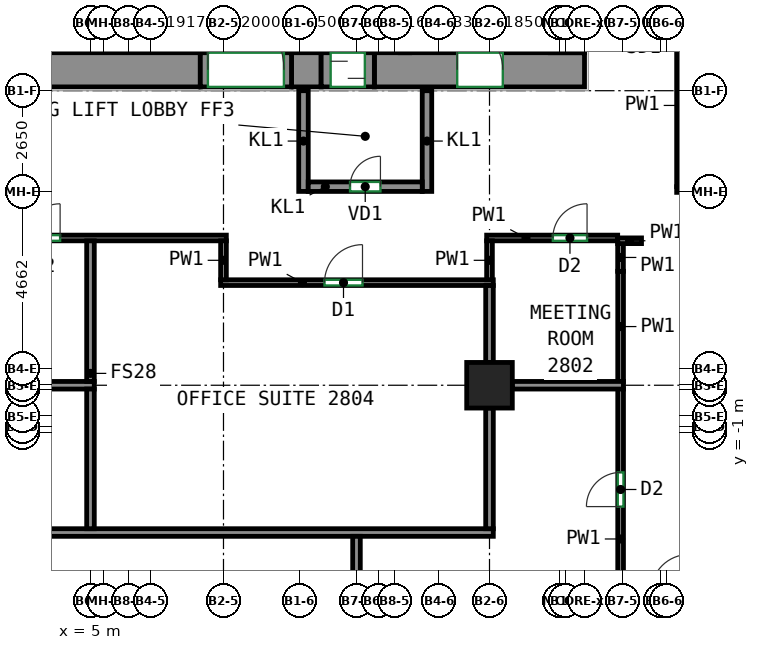
"""IFC4 building model, lengths in metres.
Left out: names, types, materials, properties, quantities, classifications, styles, units other than length and angle.
Written with IfcOpenShell. Run it as: python <this file> out.ifc"""

import sys

from ifc_helpers import new_model, si_unit, direction, frame, frame_2d, origin, origin_2d, place, context, subcontext, project, spatial, rectangle, extrude, source, transform, mapped, element, fill, save


model = new_model("IFC4")
c1 = context("Model", 3, precision=1e-05, world=origin(), true_north=direction((0.0, 1.0)))
c2 = subcontext(c1, "Body", "Model", "MODEL_VIEW")
j1 = project(units=[si_unit("LENGTHUNIT", "METRE"), si_unit("PLANEANGLEUNIT", "RADIAN")], contexts=[c1])
p1 = place(None, origin())
s1 = spatial("IfcSite", under=j1, at=p1, CompositionType="ELEMENT")
p2 = place(p1, origin())
s2 = spatial("IfcBuilding", under=s1, at=p2, CompositionType="ELEMENT")
p3 = place(p2, frame((0.0, 0.0, 120.6)))
s3 = spatial("IfcBuildingStorey", under=s2, at=p3, CompositionType="ELEMENT", Elevation=120.6)
m1 = source(origin(), c2, "Body", "SweptSolid", [
    extrude(rectangle(XDim=1.2, YDim=1.2, at=origin_2d()), origin(), (0.0, 0.0, 1.0), 3.72),
])
p4 = place(p3, frame((15.5, 0.25, 0.0), z_axis=(0.0, 0.0, 1.0), x_axis=(1.0, 0.0, 0.0)))
e1 = element("IfcColumn", 1, at=p4, inside=s3, PredefinedType="COLUMN", context=c2, shape_type="MappedRepresentation", body=[
    mapped(m1, transform((0.0, 0.0, 0.0))),
])
m2 = source(origin(), c2, "Body", "SweptSolid", [
    extrude(rectangle(XDim=14.18, YDim=0.9, at=frame_2d((7.09, 0.0))), origin(), (0.0, 0.0, 1.0), 3.72),
])
p5 = place(p3, frame((-6.29, 8.55, 0.0), z_axis=(0.0, 0.0, 1.0), x_axis=(1.0, 0.0, 0.0)))
e2 = element("IfcWall", 2, at=p5, inside=s3, PredefinedType="SHEAR", context=c2, shape_type="MappedRepresentation", body=[
    mapped(m2, transform((0.0, 0.0, 0.0))),
])
m3 = source(origin(), c2, "Body", "SweptSolid", [
    extrude(rectangle(XDim=0.78, YDim=0.9, at=frame_2d((0.39, 0.0))), origin(), (0.0, 0.0, 1.0), 3.72),
])
p6 = place(p3, frame((10.29, 8.55, 0.0), z_axis=(0.0, 0.0, 1.0), x_axis=(1.0, 0.0, 0.0)))
e3 = element("IfcWall", 3, at=p6, inside=s3, PredefinedType="SHEAR", context=c2, shape_type="MappedRepresentation", body=[
    mapped(m3, transform((0.0, 0.0, 0.0))),
])
m4 = source(origin(), c2, "Body", "SweptSolid", [
    extrude(rectangle(XDim=5.53, YDim=0.9, at=frame_2d((2.765, 0.0))), origin(), (0.0, 0.0, 1.0), 3.72),
])
p7 = place(p3, frame((12.47, 8.55, 0.0), z_axis=(0.0, 0.0, 1.0), x_axis=(1.0, 0.0, 0.0)))
e4 = element("IfcWall", 4, at=p7, inside=s3, PredefinedType="SHEAR", context=c2, shape_type="MappedRepresentation", body=[
    mapped(m4, transform((0.0, 0.0, 0.0))),
])
p8 = place(p7, frame((2.18, 0.0, 0.0)))
e5 = element("IfcOpeningElement", 5, at=p8, cuts=e4, PredefinedType="OPENING", context=c2, shape_type="SweptSolid", body=[
    extrude(rectangle(XDim=1.2, YDim=2.1, at=frame_2d((0.6, 1.05))), frame((0.0, 0.46, 0.0), z_axis=(0.0, -1.0, 0.0), x_axis=(1.0, 0.0, 0.0)), (0.0, 0.0, 1.0), 0.92),
])
m5 = source(origin(), c2, "Body", "SweptSolid", [
    extrude(rectangle(XDim=2.65, YDim=0.25, at=frame_2d((1.325, 0.0))), origin(), (0.0, 0.0, 1.0), 3.72),
])
for number, where, z_axis, x_axis in (
    (6, (10.605, 5.35, 0.0), (0.0, 0.0, 1.0), (0.0, 1.0, 0.0)),
    (7, (13.855, 5.35, 0.0), (0.0, 0.0, 1.0), (0.0, 1.0, 0.0)),
):
    element("IfcWall", number, at=place(p3, frame(where, z_axis=z_axis, x_axis=x_axis)), inside=s3, PredefinedType="PARTITIONING", context=c2, shape_type="MappedRepresentation", body=[
        mapped(m5, transform((0.0, 0.0, 0.0))),
    ])
m6 = source(origin(), c2, "Body", "SweptSolid", [
    extrude(rectangle(XDim=3.0, YDim=0.25, at=frame_2d((1.5, 0.0))), origin(), (0.0, 0.0, 1.0), 3.72),
])
p9 = place(p3, frame((10.73, 5.475, 0.0), z_axis=(0.0, 0.0, 1.0), x_axis=(1.0, 0.0, 0.0)))
e8 = element("IfcWall", 8, at=p9, inside=s3, PredefinedType="PARTITIONING", context=c2, shape_type="MappedRepresentation", body=[
    mapped(m6, transform((0.0, 0.0, 0.0))),
])
p10 = place(p9, frame((1.1, 0.0, 0.0)))
e9 = element("IfcOpeningElement", 9, at=p10, cuts=e8, PredefinedType="OPENING", context=c2, shape_type="SweptSolid", body=[
    extrude(rectangle(XDim=0.8, YDim=2.0, at=frame_2d((0.4, 1.0))), frame((0.0, 0.135, 0.0), z_axis=(0.0, -1.0, 0.0), x_axis=(1.0, 0.0, 0.0)), (0.0, 0.0, 1.0), 0.27),
])
m7 = source(origin(), c2, "Body", "SweptSolid", [
    extrude(rectangle(XDim=2.4, YDim=0.9, at=frame_2d((1.2, 0.0))), origin(), (0.0, 0.0, 1.0), 2.7),
])
p11 = place(p3, frame((7.89, 8.55, 0.0), z_axis=(0.0, 0.0, 1.0), x_axis=(1.0, 0.0, 0.0)))
e10 = element("IfcWall", 10, at=p11, inside=s3, PredefinedType="PARTITIONING", context=c2, shape_type="MappedRepresentation", body=[
    mapped(m7, transform((0.0, 0.0, 0.0))),
])
p12 = place(p11, frame((0.2, 0.0, 0.0)))
e11 = element("IfcOpeningElement", 11, at=p12, cuts=e10, PredefinedType="OPENING", context=c2, shape_type="SweptSolid", body=[
    extrude(rectangle(XDim=2.0, YDim=2.1, at=frame_2d((1.0, 1.05))), frame((0.0, 0.46, 0.0), z_axis=(0.0, -1.0, 0.0), x_axis=(1.0, 0.0, 0.0)), (0.0, 0.0, 1.0), 0.92),
])
m8 = source(origin(), c2, "Body", "SweptSolid", [
    extrude(rectangle(XDim=1.4, YDim=0.9, at=frame_2d((0.7, 0.0))), origin(), (0.0, 0.0, 1.0), 2.7),
])
p13 = place(p3, frame((11.07, 8.55, 0.0), z_axis=(0.0, 0.0, 1.0), x_axis=(1.0, 0.0, 0.0)))
e12 = element("IfcWall", 12, at=p13, inside=s3, PredefinedType="PARTITIONING", context=c2, shape_type="MappedRepresentation", body=[
    mapped(m8, transform((0.0, 0.0, 0.0))),
])
p14 = place(p13, frame((0.25, 0.0, 0.0)))
e13 = element("IfcOpeningElement", 13, at=p14, cuts=e12, PredefinedType="OPENING", context=c2, shape_type="SweptSolid", body=[
    extrude(rectangle(XDim=0.9, YDim=2.1, at=frame_2d((0.45, 1.05))), frame((0.0, 0.46, 0.0), z_axis=(0.0, -1.0, 0.0), x_axis=(1.0, 0.0, 0.0)), (0.0, 0.0, 1.0), 0.92),
])
p15 = place(p3, frame((-2.075, 4.125, 0.0), z_axis=(0.0, 0.0, 1.0), x_axis=(1.0, 0.0, 0.0)))
e14 = element("IfcWall", 14, at=p15, inside=s3, PredefinedType="PARTITIONING", context=c2, shape_type="SweptSolid", body=[
    extrude(rectangle(XDim=10.65, YDim=0.15, at=frame_2d((5.325, 0.0))), origin(), (0.0, 0.0, 1.0), 3.72),
])
p16 = place(p15, frame((5.376, 0.0, 0.0)))
e15 = element("IfcOpeningElement", 15, at=p16, cuts=e14, PredefinedType="OPENING", context=c2, shape_type="SweptSolid", body=[
    extrude(rectangle(XDim=0.9, YDim=2.1, at=frame_2d((0.45, 1.05))), frame((0.0, 0.085, 0.0), z_axis=(0.0, -1.0, 0.0), x_axis=(1.0, 0.0, 0.0)), (0.0, 0.0, 1.0), 0.17),
])
p17 = place(p3, frame((8.425, 2.95, 0.0), z_axis=(0.0, 0.0, 1.0), x_axis=(1.0, 0.0, 0.0)))
e16 = element("IfcWall", 16, at=p17, inside=s3, PredefinedType="PARTITIONING", context=c2, shape_type="SweptSolid", body=[
    extrude(rectangle(XDim=7.175, YDim=0.15, at=frame_2d((3.587, 0.0))), origin(), (0.0, 0.0, 1.0), 3.72),
])
p18 = place(p17, frame((2.733, 0.0, 0.0)))
e17 = element("IfcOpeningElement", 17, at=p18, cuts=e16, PredefinedType="OPENING", context=c2, shape_type="SweptSolid", body=[
    extrude(rectangle(XDim=1.0, YDim=2.1, at=frame_2d((0.5, 1.05))), frame((0.0, 0.085, 0.0), z_axis=(0.0, -1.0, 0.0), x_axis=(1.0, 0.0, 0.0)), (0.0, 0.0, 1.0), 0.17),
])
p19 = place(p3, frame((8.5, 4.05, 0.0), z_axis=(0.0, 0.0, 1.0), x_axis=(0.0, -1.0, 0.0)))
e18 = element("IfcWall", 18, at=p19, inside=s3, PredefinedType="PARTITIONING", context=c2, shape_type="SweptSolid", body=[
    extrude(rectangle(XDim=1.025, YDim=0.15, at=frame_2d((0.513, 0.0))), origin(), (0.0, 0.0, 1.0), 3.72),
])
p20 = place(p3, frame((18.95, -7.75, 0.0), z_axis=(0.0, 0.0, 1.0), x_axis=(0.0, 1.0, 0.0)))
e19 = element("IfcWall", 19, at=p20, inside=s3, PredefinedType="PARTITIONING", context=c2, shape_type="SweptSolid", body=[
    extrude(rectangle(XDim=7.91, YDim=0.15, at=frame_2d((3.955, 0.0))), origin(), (0.0, 0.0, 1.0), 3.72),
])
p21 = place(p20, frame((4.807, 0.0, 0.0)))
e20 = element("IfcOpeningElement", 20, at=p21, cuts=e19, PredefinedType="OPENING", context=c2, shape_type="SweptSolid", body=[
    extrude(rectangle(XDim=0.9, YDim=2.1, at=frame_2d((0.45, 1.05))), frame((0.0, 0.085, 0.0), z_axis=(0.0, -1.0, 0.0), x_axis=(1.0, 0.0, 0.0)), (0.0, 0.0, 1.0), 0.17),
])
p22 = place(p3, frame((18.95, 0.34, 0.0), z_axis=(0.0, 0.0, 1.0), x_axis=(0.0, 1.0, 0.0)))
e21 = element("IfcWall", 21, at=p22, inside=s3, PredefinedType="PARTITIONING", context=c2, shape_type="SweptSolid", body=[
    extrude(rectangle(XDim=2.908, YDim=0.15, at=frame_2d((1.454, 0.0))), origin(), (0.0, 0.0, 1.0), 3.72),
])
p23 = place(p3, frame((18.948, 3.977, 0.0), z_axis=(0.0, 0.0, 1.0), x_axis=(0.0, -1.0, 0.0)))
e22 = element("IfcWall", 22, at=p23, inside=s3, PredefinedType="PARTITIONING", context=c2, shape_type="SweptSolid", body=[
    extrude(rectangle(XDim=0.729, YDim=0.15, at=frame_2d((0.365, 0.0))), origin(), (0.0, 0.0, 1.0), 3.72),
])
p24 = place(p3, frame((18.873, 4.052, 0.0), z_axis=(0.0, 0.0, 1.0), x_axis=(1.0, 0.0, 0.0)))
e23 = element("IfcWall", 23, at=p24, inside=s3, PredefinedType="PARTITIONING", context=c2, shape_type="SweptSolid", body=[
    extrude(rectangle(XDim=0.627, YDim=0.15, at=frame_2d((0.313, 0.0))), origin(), (0.0, 0.0, 1.0), 3.72),
])
p25 = place(p3, frame((15.425, 4.125, 0.0), z_axis=(0.0, 0.0, 1.0), x_axis=(1.0, 0.0, 0.0)))
e24 = element("IfcWall", 24, at=p25, inside=s3, PredefinedType="PARTITIONING", context=c2, shape_type="SweptSolid", body=[
    extrude(rectangle(XDim=3.448, YDim=0.15, at=frame_2d((1.724, 0.0))), origin(), (0.0, 0.0, 1.0), 3.72),
])
p26 = place(p25, frame((1.742, 0.0, 0.0)))
e25 = element("IfcOpeningElement", 25, at=p26, cuts=e24, PredefinedType="OPENING", context=c2, shape_type="SweptSolid", body=[
    extrude(rectangle(XDim=0.9, YDim=2.1, at=frame_2d((0.45, 1.05))), frame((0.0, 0.085, 0.0), z_axis=(0.0, -1.0, 0.0), x_axis=(1.0, 0.0, 0.0)), (0.0, 0.0, 1.0), 0.17),
])
p27 = place(p3, frame((15.5, 3.025, 0.0), z_axis=(0.0, 0.0, 1.0), x_axis=(0.0, 1.0, 0.0)))
e26 = element("IfcWall", 26, at=p27, inside=s3, PredefinedType="PARTITIONING", context=c2, shape_type="SweptSolid", body=[
    extrude(rectangle(XDim=1.025, YDim=0.15, at=frame_2d((0.513, 0.0))), origin(), (0.0, 0.0, 1.0), 3.72),
])
p28 = place(p3, frame((20.5, 5.475, 0.0), z_axis=(0.0, 0.0, 1.0), x_axis=(0.0, 1.0, 0.0)))
e27 = element("IfcWall", 27, at=p28, inside=s3, PredefinedType="PARTITIONING", context=c2, shape_type="SweptSolid", body=[
    extrude(rectangle(XDim=4.275, YDim=0.15, at=frame_2d((2.137, 0.0))), origin(), (0.0, 0.0, 1.0), 3.72),
])
p29 = place(p3, frame((20.425, 5.4, 0.0), z_axis=(0.0, 0.0, 1.0), x_axis=(1.0, 0.0, 0.0)))
e28 = element("IfcWall", 28, at=p29, inside=s3, PredefinedType="PARTITIONING", context=c2, shape_type="SweptSolid", body=[
    extrude(rectangle(XDim=6.85, YDim=0.15, at=frame_2d((3.425, 0.0))), origin(), (0.0, 0.0, 1.0), 3.72),
])
p30 = place(p29, frame((2.752, 0.0, 0.0)))
e29 = element("IfcOpeningElement", 29, at=p30, cuts=e28, PredefinedType="OPENING", context=c2, shape_type="SweptSolid", body=[
    extrude(rectangle(XDim=1.0, YDim=2.1, at=frame_2d((0.5, 1.05))), frame((0.0, 0.085, 0.0), z_axis=(0.0, -1.0, 0.0), x_axis=(1.0, 0.0, 0.0)), (0.0, 0.0, 1.0), 0.17),
])
p31 = place(p3, frame((-17.874, -3.625, 0.0), z_axis=(0.0, 0.0, 1.0), x_axis=(1.0, 0.0, 0.0)))
e30 = element("IfcWall", 30, at=p31, inside=s3, PredefinedType="PARTITIONING", context=c2, shape_type="SweptSolid", body=[
    extrude(rectangle(XDim=33.474, YDim=0.2, at=frame_2d((16.737, 0.0))), origin(), (0.0, 0.0, 1.0), 3.72),
])
p32 = place(p3, frame((12.0, -11.275, 0.0), z_axis=(0.0, 0.0, 1.0), x_axis=(0.0, 1.0, 0.0)))
e31 = element("IfcWall", 31, at=p32, inside=s3, PredefinedType="PARTITIONING", context=c2, shape_type="SweptSolid", body=[
    extrude(rectangle(XDim=7.55, YDim=0.2, at=frame_2d((3.775, 0.0))), origin(), (0.0, 0.0, 1.0), 3.72),
])
p33 = place(p3, frame((-2.1, 0.25, 0.0), z_axis=(0.0, 0.0, 1.0), x_axis=(1.0, 0.0, 0.0)))
e32 = element("IfcWall", 32, at=p33, inside=s3, PredefinedType="PARTITIONING", context=c2, shape_type="SweptSolid", body=[
    extrude(rectangle(XDim=7.2, YDim=0.2, at=frame_2d((3.6, 0.0))), origin(), (0.0, 0.0, 1.0), 3.07),
])
p34 = place(p3, frame((5.0, -3.525, 0.0), z_axis=(0.0, 0.0, 1.0), x_axis=(0.0, 1.0, 0.0)))
e33 = element("IfcWall", 33, at=p34, inside=s3, PredefinedType="PARTITIONING", context=c2, shape_type="SweptSolid", body=[
    extrude(rectangle(XDim=3.675, YDim=0.2, at=frame_2d((1.837, 0.0))), origin(), (0.0, 0.0, 1.0), 3.72),
])
p35 = place(p3, frame((5.0, 0.35, 0.0), z_axis=(0.0, 0.0, 1.0), x_axis=(0.0, 1.0, 0.0)))
e34 = element("IfcWall", 34, at=p35, inside=s3, PredefinedType="PARTITIONING", context=c2, shape_type="SweptSolid", body=[
    extrude(rectangle(XDim=3.699, YDim=0.2, at=frame_2d((1.85, 0.0))), origin(), (0.0, 0.0, 1.0), 3.72),
])
p36 = place(p3, frame((15.5, -3.525, 0.0), z_axis=(0.0, 0.0, 1.0), x_axis=(0.0, 1.0, 0.0)))
e35 = element("IfcWall", 35, at=p36, inside=s3, PredefinedType="PARTITIONING", context=c2, shape_type="SweptSolid", body=[
    extrude(rectangle(XDim=3.175, YDim=0.2, at=frame_2d((1.587, 0.0))), origin(), (0.0, 0.0, 1.0), 3.72),
])
p37 = place(p3, frame((15.5, 0.85, 0.0), z_axis=(0.0, 0.0, 1.0), x_axis=(0.0, 1.0, 0.0)))
e36 = element("IfcWall", 36, at=p37, inside=s3, PredefinedType="PARTITIONING", context=c2, shape_type="SweptSolid", body=[
    extrude(rectangle(XDim=2.024, YDim=0.2, at=frame_2d((1.012, 0.0))), origin(), (0.0, 0.0, 1.0), 3.72),
])
p38 = place(p3, frame((16.1, 0.25, 0.0), z_axis=(0.0, 0.0, 1.0), x_axis=(1.0, 0.0, 0.0)))
e37 = element("IfcWall", 37, at=p38, inside=s3, PredefinedType="PARTITIONING", context=c2, shape_type="SweptSolid", body=[
    extrude(rectangle(XDim=2.924, YDim=0.2, at=frame_2d((1.462, 0.0))), origin(), (0.0, 0.0, 1.0), 3.72),
])
p39 = place(p12, origin())
e38 = element("IfcDoor", 38, at=p39, inside=s3, OperationType="DOUBLE_DOOR_SINGLE_SWING", PredefinedType="DOOR", context=c2, shape_type="SweptSolid", body=[
    extrude(rectangle(XDim=2.0, YDim=2.1, at=frame_2d((1.0, 1.05))), frame((0.0, 0.355, 0.0), z_axis=(0.0, -1.0, 0.0), x_axis=(1.0, 0.0, 0.0)), (0.0, 0.0, 1.0), 0.05),
])
fill(e11, e38)
p40 = place(p10, origin())
e39 = element("IfcDoor", 39, at=p40, inside=s3, OperationType="SINGLE_SWING_RIGHT", PredefinedType="DOOR", context=c2, shape_type="SweptSolid", body=[
    extrude(rectangle(XDim=0.8, YDim=2.0, at=frame_2d((0.4, 1.0))), frame((0.0, 0.025, 0.0), z_axis=(0.0, -1.0, 0.0), x_axis=(1.0, 0.0, 0.0)), (0.0, 0.0, 1.0), 0.05),
])
fill(e9, e39)
p41 = place(p14, origin())
e40 = element("IfcDoor", 40, at=p41, inside=s3, OperationType="SLIDING_TO_LEFT", PredefinedType="DOOR", context=c2, shape_type="SweptSolid", body=[
    extrude(rectangle(XDim=0.9, YDim=2.1, at=frame_2d((0.45, 1.05))), frame((0.0, 0.355, 0.0), z_axis=(0.0, -1.0, 0.0), x_axis=(1.0, 0.0, 0.0)), (0.0, 0.0, 1.0), 0.05),
])
fill(e13, e40)
p42 = place(p8, origin())
e41 = element("IfcDoor", 41, at=p42, inside=s3, OperationType="DOUBLE_DOOR_SINGLE_SWING", PredefinedType="DOOR", context=c2, shape_type="SweptSolid", body=[
    extrude(rectangle(XDim=1.2, YDim=2.1, at=frame_2d((0.6, 1.05))), frame((0.0, 0.355, 0.0), z_axis=(0.0, -1.0, 0.0), x_axis=(1.0, 0.0, 0.0)), (0.0, 0.0, 1.0), 0.05),
])
fill(e5, e41)
p43 = place(p21, origin())
e42 = element("IfcDoor", 42, at=p43, inside=s3, OperationType="SINGLE_SWING_LEFT", PredefinedType="DOOR", context=c2, shape_type="SweptSolid", body=[
    extrude(rectangle(XDim=0.9, YDim=2.1, at=frame_2d((0.45, 1.05))), frame((0.0, 0.025, 0.0), z_axis=(0.0, -1.0, 0.0), x_axis=(1.0, 0.0, 0.0)), (0.0, 0.0, 1.0), 0.05),
])
fill(e20, e42)
p44 = place(p18, origin())
e43 = element("IfcDoor", 43, at=p44, inside=s3, OperationType="SINGLE_SWING_RIGHT", PredefinedType="DOOR", context=c2, shape_type="SweptSolid", body=[
    extrude(rectangle(XDim=1.0, YDim=2.1, at=frame_2d((0.5, 1.05))), frame((0.0, 0.025, 0.0), z_axis=(0.0, -1.0, 0.0), x_axis=(1.0, 0.0, 0.0)), (0.0, 0.0, 1.0), 0.05),
])
fill(e17, e43)
p45 = place(p16, origin())
e44 = element("IfcDoor", 44, at=p45, inside=s3, OperationType="SINGLE_SWING_RIGHT", PredefinedType="DOOR", context=c2, shape_type="SweptSolid", body=[
    extrude(rectangle(XDim=0.9, YDim=2.1, at=frame_2d((0.45, 1.05))), frame((0.0, 0.025, 0.0), z_axis=(0.0, -1.0, 0.0), x_axis=(1.0, 0.0, 0.0)), (0.0, 0.0, 1.0), 0.05),
])
fill(e15, e44)
p46 = place(p26, origin())
e45 = element("IfcDoor", 45, at=p46, inside=s3, OperationType="SINGLE_SWING_RIGHT", PredefinedType="DOOR", context=c2, shape_type="SweptSolid", body=[
    extrude(rectangle(XDim=0.9, YDim=2.1, at=frame_2d((0.45, 1.05))), frame((0.0, 0.025, 0.0), z_axis=(0.0, -1.0, 0.0), x_axis=(1.0, 0.0, 0.0)), (0.0, 0.0, 1.0), 0.05),
])
fill(e25, e45)
save(model, sys.argv[1])
